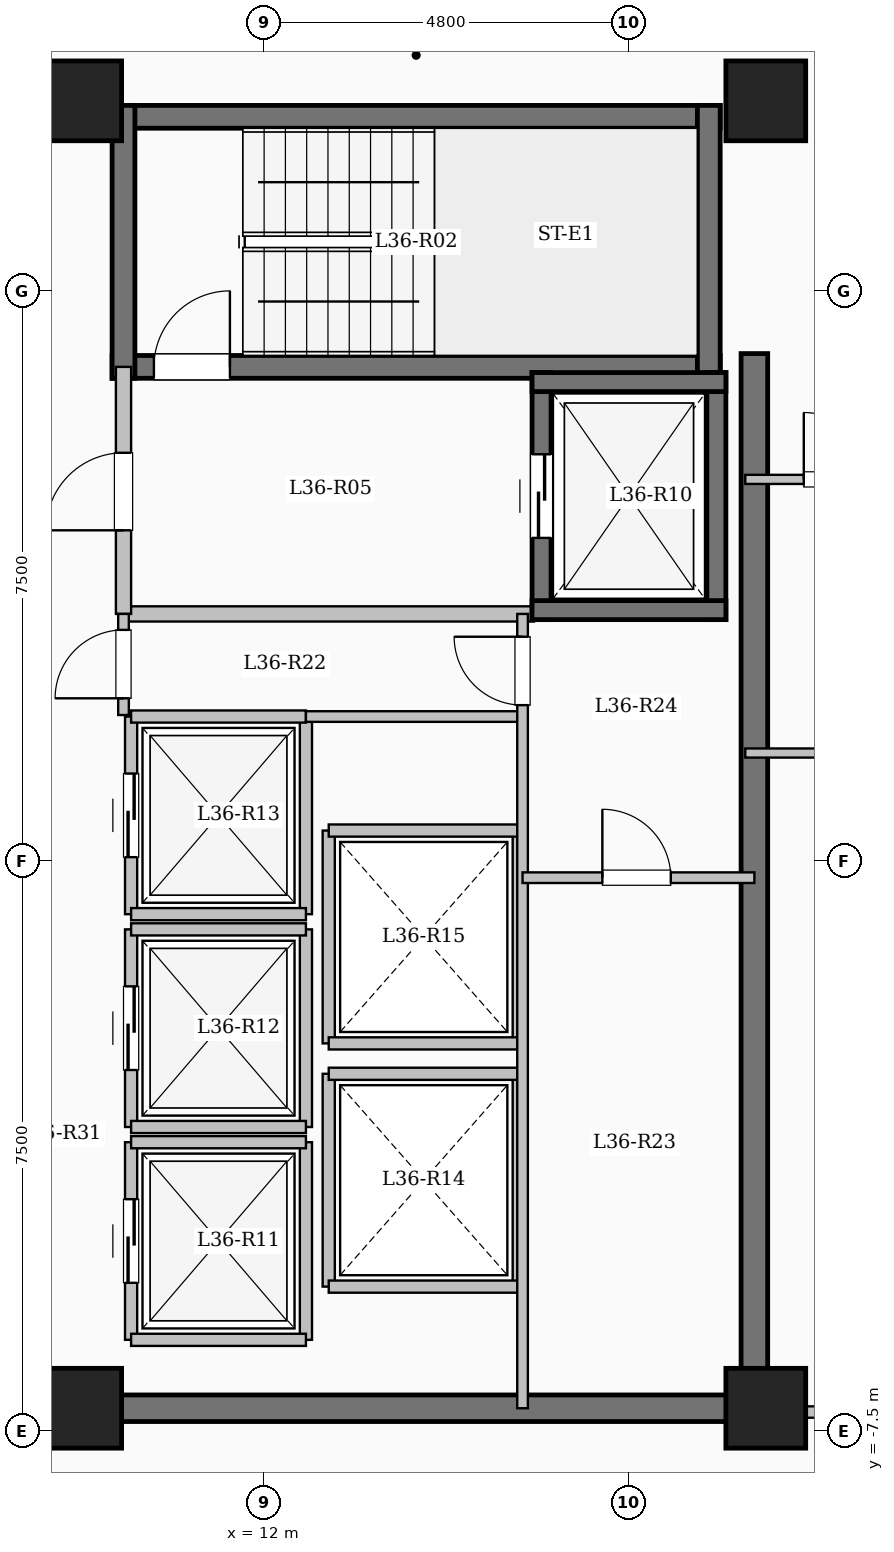
"""IFC4 building model, lengths in metres.
Left out: names, types, materials, properties, quantities, classifications, styles, units other than length and angle.
Written with IfcOpenShell. Run it as: python <this file> out.ifc"""

import sys

from ifc_helpers import new_model, si_unit, direction, frame, frame_2d, origin, origin_2d, place, context, subcontext, project, spatial, rectangle, extrude, element, fill, save


model = new_model("IFC4")
c1 = context("Model", 3, precision=1e-05, world=origin(), true_north=direction((0.0, 1.0)))
c2 = subcontext(c1, "Body", "Model", "MODEL_VIEW")
j1 = project(units=[si_unit("LENGTHUNIT", "METRE"), si_unit("PLANEANGLEUNIT", "RADIAN")], contexts=[c1])
p1 = place(None, origin())
s1 = spatial("IfcSite", under=j1, at=p1, CompositionType="ELEMENT")
p2 = place(p1, origin())
s2 = spatial("IfcBuilding", under=s1, at=p2, CompositionType="ELEMENT")
p3 = place(p2, frame((0.0, 0.0, 135.95)))
s3 = spatial("IfcBuildingStorey", under=s2, at=p3, CompositionType="ELEMENT", Elevation=135.95)
for number, where, z_axis, x_axis in (
    (1, (9.6, -7.2, 0.0), (0.0, 0.0, 1.0), (1.0, 0.0, 0.0)),
    (2, (9.6, 10.0, 0.0), (0.0, 0.0, 1.0), (1.0, 0.0, 0.0)),
    (3, (18.6, -7.2, 0.0), (0.0, 0.0, 1.0), (1.0, 0.0, 0.0)),
    (4, (18.6, 10.0, 0.0), (0.0, 0.0, 1.0), (1.0, 0.0, 0.0)),
):
    element("IfcColumn", number, at=place(p3, frame(where, z_axis=z_axis, x_axis=x_axis)), inside=s3, PredefinedType="COLUMN", context=c2, shape_type="SweptSolid", body=[
        extrude(rectangle(XDim=1.05, YDim=1.05, at=origin_2d()), origin(), (0.0, 0.0, 1.0), 3.35),
    ])
p4 = place(p3, frame((10.0, 9.79, 0.0), z_axis=(0.0, 0.0, 1.0), x_axis=(1.0, 0.0, 0.0)))
e5 = element("IfcWall", 5, at=p4, inside=s3, PredefinedType="SHEAR", context=c2, shape_type="SweptSolid", body=[
    extrude(rectangle(XDim=8.0, YDim=0.3, at=frame_2d((4.0, 0.0))), origin(), (0.0, 0.0, 1.0), 3.35),
])
p5 = place(p3, frame((10.0, 6.5, 0.0), z_axis=(0.0, 0.0, 1.0), x_axis=(1.0, 0.0, 0.0)))
e6 = element("IfcWall", 6, at=p5, inside=s3, PredefinedType="SHEAR", context=c2, shape_type="SweptSolid", body=[
    extrude(rectangle(XDim=8.0, YDim=0.3, at=frame_2d((4.0, 0.0))), origin(), (0.0, 0.0, 1.0), 3.35),
])
p6 = place(p5, frame((0.55, 0.0, 0.0)))
e7 = element("IfcOpeningElement", 7, at=p6, cuts=e6, PredefinedType="OPENING", context=c2, shape_type="SweptSolid", body=[
    extrude(rectangle(XDim=1.0, YDim=2.15, at=frame_2d((0.5, 1.075))), frame((0.0, 0.16, 0.0), z_axis=(0.0, -1.0, 0.0), x_axis=(1.0, 0.0, 0.0)), (0.0, 0.0, 1.0), 0.32),
])
for number, where, z_axis, x_axis in (
    (8, (10.15, 6.35, 0.0), (0.0, 0.0, 1.0), (0.0, 1.0, 0.0)),
    (9, (17.85, 6.35, 0.0), (0.0, 0.0, 1.0), (0.0, 1.0, 0.0)),
):
    element("IfcWall", number, at=place(p3, frame(where, z_axis=z_axis, x_axis=x_axis)), inside=s3, PredefinedType="SHEAR", context=c2, shape_type="SweptSolid", body=[
        extrude(rectangle(XDim=3.59, YDim=0.3, at=frame_2d((1.795, 0.0))), origin(), (0.0, 0.0, 1.0), 3.35),
    ])
p7 = place(p3, frame((10.15, 3.25, 0.0), z_axis=(0.0, 0.0, 1.0), x_axis=(1.0, 0.0, 0.0)))
e10 = element("IfcWall", 10, at=p7, inside=s3, PredefinedType="SOLIDWALL", context=c2, shape_type="SweptSolid", body=[
    extrude(rectangle(XDim=5.4, YDim=0.2, at=frame_2d((2.7, 0.0))), origin(), (0.0, 0.0, 1.0), 3.1),
])
p8 = place(p3, frame((10.15, 3.25, 0.0), z_axis=(0.0, 0.0, 1.0), x_axis=(0.0, 1.0, 0.0)))
e11 = element("IfcWall", 11, at=p8, inside=s3, PredefinedType="SOLIDWALL", context=c2, shape_type="SweptSolid", body=[
    extrude(rectangle(XDim=3.25, YDim=0.2, at=frame_2d((1.625, 0.0))), origin(), (0.0, 0.0, 1.0), 3.1),
])
p9 = place(p8, frame((1.1, 0.0, 0.0)))
e12 = element("IfcOpeningElement", 12, at=p9, cuts=e11, PredefinedType="OPENING", context=c2, shape_type="SweptSolid", body=[
    extrude(rectangle(XDim=1.02, YDim=2.15, at=frame_2d((0.51, 1.075))), frame((0.0, 0.11, 0.0), z_axis=(0.0, -1.0, 0.0), x_axis=(1.0, 0.0, 0.0)), (0.0, 0.0, 1.0), 0.22),
])
p10 = place(p3, frame((15.65, 3.175, 0.0), z_axis=(0.0, 0.0, 1.0), x_axis=(0.0, 1.0, 0.0)))
e13 = element("IfcWall", 13, at=p10, inside=s3, PredefinedType="SHEAR", context=c2, shape_type="SweptSolid", body=[
    extrude(rectangle(XDim=3.25, YDim=0.25, at=frame_2d((1.625, 0.0))), origin(), (0.0, 0.0, 1.0), 3.35),
])
p11 = place(p10, frame((1.075, 0.0, 0.0)))
e14 = element("IfcOpeningElement", 14, at=p11, cuts=e13, PredefinedType="OPENING", context=c2, shape_type="SweptSolid", body=[
    extrude(rectangle(XDim=1.1, YDim=2.15, at=frame_2d((0.55, 1.075))), frame((0.0, 0.135, 0.0), z_axis=(0.0, -1.0, 0.0), x_axis=(1.0, 0.0, 0.0)), (0.0, 0.0, 1.0), 0.27),
])
p12 = place(p3, frame((17.95, 3.175, 0.0), z_axis=(0.0, 0.0, 1.0), x_axis=(0.0, 1.0, 0.0)))
e15 = element("IfcWall", 15, at=p12, inside=s3, PredefinedType="SHEAR", context=c2, shape_type="SweptSolid", body=[
    extrude(rectangle(XDim=3.25, YDim=0.25, at=frame_2d((1.625, 0.0))), origin(), (0.0, 0.0, 1.0), 3.35),
])
for number, where, z_axis, x_axis in (
    (16, (15.525, 3.3, 0.0), (0.0, 0.0, 1.0), (1.0, 0.0, 0.0)),
    (17, (15.525, 6.3, 0.0), (0.0, 0.0, 1.0), (1.0, 0.0, 0.0)),
):
    element("IfcWall", number, at=place(p3, frame(where, z_axis=z_axis, x_axis=x_axis)), inside=s3, PredefinedType="SHEAR", context=c2, shape_type="SweptSolid", body=[
        extrude(rectangle(XDim=2.55, YDim=0.25, at=frame_2d((1.275, 0.0))), origin(), (0.0, 0.0, 1.0), 3.35),
    ])
p13 = place(p3, frame((10.25, -6.3, 0.0), z_axis=(0.0, 0.0, 1.0), x_axis=(0.0, 1.0, 0.0)))
e18 = element("IfcWall", 18, at=p13, inside=s3, PredefinedType="SOLIDWALL", context=c2, shape_type="SweptSolid", body=[
    extrude(rectangle(XDim=2.6, YDim=0.16, at=frame_2d((1.3, 0.0))), origin(), (0.0, 0.0, 1.0), 3.1),
])
p14 = place(p13, frame((0.75, 0.0, 0.0)))
e19 = element("IfcOpeningElement", 19, at=p14, cuts=e18, PredefinedType="OPENING", context=c2, shape_type="SweptSolid", body=[
    extrude(rectangle(XDim=1.1, YDim=2.15, at=frame_2d((0.55, 1.075))), frame((0.0, 0.09, 0.0), z_axis=(0.0, -1.0, 0.0), x_axis=(1.0, 0.0, 0.0)), (0.0, 0.0, 1.0), 0.18),
])
p15 = place(p3, frame((12.55, -6.3, 0.0), z_axis=(0.0, 0.0, 1.0), x_axis=(0.0, 1.0, 0.0)))
e20 = element("IfcWall", 20, at=p15, inside=s3, PredefinedType="SOLIDWALL", context=c2, shape_type="SweptSolid", body=[
    extrude(rectangle(XDim=2.6, YDim=0.16, at=frame_2d((1.3, 0.0))), origin(), (0.0, 0.0, 1.0), 3.1),
])
for number, where, z_axis, x_axis in (
    (21, (10.25, -6.3, 0.0), (0.0, 0.0, 1.0), (1.0, 0.0, 0.0)),
    (22, (10.25, -3.7, 0.0), (0.0, 0.0, 1.0), (1.0, 0.0, 0.0)),
):
    element("IfcWall", number, at=place(p3, frame(where, z_axis=z_axis, x_axis=x_axis)), inside=s3, PredefinedType="SOLIDWALL", context=c2, shape_type="SweptSolid", body=[
        extrude(rectangle(XDim=2.3, YDim=0.16, at=frame_2d((1.15, 0.0))), origin(), (0.0, 0.0, 1.0), 3.1),
    ])
p16 = place(p3, frame((10.25, -3.5, 0.0), z_axis=(0.0, 0.0, 1.0), x_axis=(0.0, 1.0, 0.0)))
e23 = element("IfcWall", 23, at=p16, inside=s3, PredefinedType="SOLIDWALL", context=c2, shape_type="SweptSolid", body=[
    extrude(rectangle(XDim=2.6, YDim=0.16, at=frame_2d((1.3, 0.0))), origin(), (0.0, 0.0, 1.0), 3.1),
])
p17 = place(p16, frame((0.75, 0.0, 0.0)))
e24 = element("IfcOpeningElement", 24, at=p17, cuts=e23, PredefinedType="OPENING", context=c2, shape_type="SweptSolid", body=[
    extrude(rectangle(XDim=1.1, YDim=2.15, at=frame_2d((0.55, 1.075))), frame((0.0, 0.09, 0.0), z_axis=(0.0, -1.0, 0.0), x_axis=(1.0, 0.0, 0.0)), (0.0, 0.0, 1.0), 0.18),
])
p18 = place(p3, frame((12.55, -3.5, 0.0), z_axis=(0.0, 0.0, 1.0), x_axis=(0.0, 1.0, 0.0)))
e25 = element("IfcWall", 25, at=p18, inside=s3, PredefinedType="SOLIDWALL", context=c2, shape_type="SweptSolid", body=[
    extrude(rectangle(XDim=2.6, YDim=0.16, at=frame_2d((1.3, 0.0))), origin(), (0.0, 0.0, 1.0), 3.1),
])
for number, where, z_axis, x_axis in (
    (26, (10.25, -3.5, 0.0), (0.0, 0.0, 1.0), (1.0, 0.0, 0.0)),
    (27, (10.25, -0.9, 0.0), (0.0, 0.0, 1.0), (1.0, 0.0, 0.0)),
):
    element("IfcWall", number, at=place(p3, frame(where, z_axis=z_axis, x_axis=x_axis)), inside=s3, PredefinedType="SOLIDWALL", context=c2, shape_type="SweptSolid", body=[
        extrude(rectangle(XDim=2.3, YDim=0.16, at=frame_2d((1.15, 0.0))), origin(), (0.0, 0.0, 1.0), 3.1),
    ])
p19 = place(p3, frame((10.25, -0.7, 0.0), z_axis=(0.0, 0.0, 1.0), x_axis=(0.0, 1.0, 0.0)))
e28 = element("IfcWall", 28, at=p19, inside=s3, PredefinedType="SOLIDWALL", context=c2, shape_type="SweptSolid", body=[
    extrude(rectangle(XDim=2.6, YDim=0.16, at=frame_2d((1.3, 0.0))), origin(), (0.0, 0.0, 1.0), 3.1),
])
p20 = place(p19, frame((0.75, 0.0, 0.0)))
e29 = element("IfcOpeningElement", 29, at=p20, cuts=e28, PredefinedType="OPENING", context=c2, shape_type="SweptSolid", body=[
    extrude(rectangle(XDim=1.1, YDim=2.15, at=frame_2d((0.55, 1.075))), frame((0.0, 0.09, 0.0), z_axis=(0.0, -1.0, 0.0), x_axis=(1.0, 0.0, 0.0)), (0.0, 0.0, 1.0), 0.18),
])
p21 = place(p3, frame((12.55, -0.7, 0.0), z_axis=(0.0, 0.0, 1.0), x_axis=(0.0, 1.0, 0.0)))
e30 = element("IfcWall", 30, at=p21, inside=s3, PredefinedType="SOLIDWALL", context=c2, shape_type="SweptSolid", body=[
    extrude(rectangle(XDim=2.6, YDim=0.16, at=frame_2d((1.3, 0.0))), origin(), (0.0, 0.0, 1.0), 3.1),
])
for number, where, z_axis, x_axis in (
    (31, (10.25, -0.7, 0.0), (0.0, 0.0, 1.0), (1.0, 0.0, 0.0)),
    (32, (10.25, 1.9, 0.0), (0.0, 0.0, 1.0), (1.0, 0.0, 0.0)),
):
    element("IfcWall", number, at=place(p3, frame(where, z_axis=z_axis, x_axis=x_axis)), inside=s3, PredefinedType="SOLIDWALL", context=c2, shape_type="SweptSolid", body=[
        extrude(rectangle(XDim=2.3, YDim=0.16, at=frame_2d((1.15, 0.0))), origin(), (0.0, 0.0, 1.0), 3.1),
    ])
for number, where, z_axis, x_axis in (
    (33, (12.85, -5.6, 0.0), (0.0, 0.0, 1.0), (0.0, 1.0, 0.0)),
    (34, (15.35, -5.6, 0.0), (0.0, 0.0, 1.0), (0.0, 1.0, 0.0)),
):
    element("IfcWall", number, at=place(p3, frame(where, z_axis=z_axis, x_axis=x_axis)), inside=s3, PredefinedType="SOLIDWALL", context=c2, shape_type="SweptSolid", body=[
        extrude(rectangle(XDim=2.8, YDim=0.16, at=frame_2d((1.4, 0.0))), origin(), (0.0, 0.0, 1.0), 3.1),
    ])
for number, where, z_axis, x_axis in (
    (35, (12.85, -5.6, 0.0), (0.0, 0.0, 1.0), (1.0, 0.0, 0.0)),
    (36, (12.85, -2.8, 0.0), (0.0, 0.0, 1.0), (1.0, 0.0, 0.0)),
):
    element("IfcWall", number, at=place(p3, frame(where, z_axis=z_axis, x_axis=x_axis)), inside=s3, PredefinedType="SOLIDWALL", context=c2, shape_type="SweptSolid", body=[
        extrude(rectangle(XDim=2.5, YDim=0.16, at=frame_2d((1.25, 0.0))), origin(), (0.0, 0.0, 1.0), 3.1),
    ])
for number, where, z_axis, x_axis in (
    (37, (12.85, -2.4, 0.0), (0.0, 0.0, 1.0), (0.0, 1.0, 0.0)),
    (38, (15.35, -2.4, 0.0), (0.0, 0.0, 1.0), (0.0, 1.0, 0.0)),
):
    element("IfcWall", number, at=place(p3, frame(where, z_axis=z_axis, x_axis=x_axis)), inside=s3, PredefinedType="SOLIDWALL", context=c2, shape_type="SweptSolid", body=[
        extrude(rectangle(XDim=2.8, YDim=0.16, at=frame_2d((1.4, 0.0))), origin(), (0.0, 0.0, 1.0), 3.1),
    ])
for number, where, z_axis, x_axis in (
    (39, (12.85, -2.4, 0.0), (0.0, 0.0, 1.0), (1.0, 0.0, 0.0)),
    (40, (12.85, 0.4, 0.0), (0.0, 0.0, 1.0), (1.0, 0.0, 0.0)),
):
    element("IfcWall", number, at=place(p3, frame(where, z_axis=z_axis, x_axis=x_axis)), inside=s3, PredefinedType="SOLIDWALL", context=c2, shape_type="SweptSolid", body=[
        extrude(rectangle(XDim=2.5, YDim=0.16, at=frame_2d((1.25, 0.0))), origin(), (0.0, 0.0, 1.0), 3.1),
    ])
p22 = place(p3, frame((18.45, -7.375, 0.0), z_axis=(0.0, 0.0, 1.0), x_axis=(0.0, 1.0, 0.0)))
e41 = element("IfcWall", 41, at=p22, inside=s3, PredefinedType="SHEAR", context=c2, shape_type="SweptSolid", body=[
    extrude(rectangle(XDim=14.05, YDim=0.35, at=frame_2d((7.025, 0.0))), origin(), (0.0, 0.0, 1.0), 3.35),
])
p23 = place(p3, frame((10.075, -7.2, 0.0), z_axis=(0.0, 0.0, 1.0), x_axis=(1.0, 0.0, 0.0)))
e42 = element("IfcWall", 42, at=p23, inside=s3, PredefinedType="SHEAR", context=c2, shape_type="SweptSolid", body=[
    extrude(rectangle(XDim=8.55, YDim=0.35, at=frame_2d((4.275, 0.0))), origin(), (0.0, 0.0, 1.0), 3.35),
])
p24 = place(p3, frame((12.55, 1.9, 0.0), z_axis=(0.0, 0.0, 1.0), x_axis=(1.0, 0.0, 0.0)))
e43 = element("IfcWall", 43, at=p24, inside=s3, PredefinedType="PARTITIONING", context=c2, shape_type="SweptSolid", body=[
    extrude(rectangle(XDim=2.85, YDim=0.14, at=frame_2d((1.425, 0.0))), origin(), (0.0, 0.0, 1.0), 3.1),
])
p25 = place(p3, frame((10.15, 1.92, 0.0), z_axis=(0.0, 0.0, 1.0), x_axis=(0.0, 1.0, 0.0)))
e44 = element("IfcWall", 44, at=p25, inside=s3, PredefinedType="PARTITIONING", context=c2, shape_type="SweptSolid", body=[
    extrude(rectangle(XDim=1.33, YDim=0.14, at=frame_2d((0.665, 0.0))), origin(), (0.0, 0.0, 1.0), 3.1),
])
p26 = place(p25, frame((0.22, 0.0, 0.0)))
e45 = element("IfcOpeningElement", 45, at=p26, cuts=e44, PredefinedType="OPENING", context=c2, shape_type="SweptSolid", body=[
    extrude(rectangle(XDim=0.9, YDim=2.08, at=frame_2d((0.45, 1.04))), frame((0.0, 0.08, 0.0), z_axis=(0.0, -1.0, 0.0), x_axis=(1.0, 0.0, 0.0)), (0.0, 0.0, 1.0), 0.16),
])
p27 = place(p3, frame((15.4, -7.2, 0.0), z_axis=(0.0, 0.0, 1.0), x_axis=(0.0, 1.0, 0.0)))
e46 = element("IfcWall", 46, at=p27, inside=s3, PredefinedType="PARTITIONING", context=c2, shape_type="SweptSolid", body=[
    extrude(rectangle(XDim=10.45, YDim=0.14, at=frame_2d((5.225, 0.0))), origin(), (0.0, 0.0, 1.0), 3.1),
])
p28 = place(p27, frame((9.25, 0.0, 0.0)))
e47 = element("IfcOpeningElement", 47, at=p28, cuts=e46, PredefinedType="OPENING", context=c2, shape_type="SweptSolid", body=[
    extrude(rectangle(XDim=0.9, YDim=2.08, at=frame_2d((0.45, 1.04))), frame((0.0, 0.08, 0.0), z_axis=(0.0, -1.0, 0.0), x_axis=(1.0, 0.0, 0.0)), (0.0, 0.0, 1.0), 0.16),
])
p29 = place(p3, frame((15.4, -0.22, 0.0), z_axis=(0.0, 0.0, 1.0), x_axis=(1.0, 0.0, 0.0)))
e48 = element("IfcWall", 48, at=p29, inside=s3, PredefinedType="PARTITIONING", context=c2, shape_type="SweptSolid", body=[
    extrude(rectangle(XDim=3.05, YDim=0.14, at=frame_2d((1.525, 0.0))), origin(), (0.0, 0.0, 1.0), 3.1),
])
p30 = place(p29, frame((1.05, 0.0, 0.0)))
e49 = element("IfcOpeningElement", 49, at=p30, cuts=e48, PredefinedType="OPENING", context=c2, shape_type="SweptSolid", body=[
    extrude(rectangle(XDim=0.9, YDim=2.08, at=frame_2d((0.45, 1.04))), frame((0.0, 0.08, 0.0), z_axis=(0.0, -1.0, 0.0), x_axis=(1.0, 0.0, 0.0)), (0.0, 0.0, 1.0), 0.16),
])
p31 = place(p3, frame((18.45, -7.25, 0.0), z_axis=(0.0, 0.0, 1.0), x_axis=(1.0, 0.0, 0.0)))
e50 = element("IfcWall", 50, at=p31, inside=s3, PredefinedType="PARTITIONING", context=c2, shape_type="SweptSolid", body=[
    extrude(rectangle(XDim=6.63, YDim=0.15, at=frame_2d((3.315, 0.0))), origin(), (0.0, 0.0, 1.0), 3.1),
])
p32 = place(p31, frame((1.95, 0.0, 0.0)))
e51 = element("IfcOpeningElement", 51, at=p32, cuts=e50, PredefinedType="OPENING", context=c2, shape_type="SweptSolid", body=[
    extrude(rectangle(XDim=0.96, YDim=2.15, at=frame_2d((0.48, 1.075))), frame((0.0, 0.085, 0.0), z_axis=(0.0, -1.0, 0.0), x_axis=(1.0, 0.0, 0.0)), (0.0, 0.0, 1.0), 0.17),
])
p33 = place(p3, frame((18.33, 1.42, 0.0), z_axis=(0.0, 0.0, 1.0), x_axis=(1.0, 0.0, 0.0)))
e52 = element("IfcWall", 52, at=p33, inside=s3, PredefinedType="PARTITIONING", context=c2, shape_type="SweptSolid", body=[
    extrude(rectangle(XDim=6.87, YDim=0.12, at=frame_2d((3.435, 0.0))), origin(), (0.0, 0.0, 1.0), 3.1),
])
p34 = place(p33, frame((1.413, 0.0, 0.0)))
e53 = element("IfcOpeningElement", 53, at=p34, cuts=e52, PredefinedType="OPENING", context=c2, shape_type="SweptSolid", body=[
    extrude(rectangle(XDim=0.88, YDim=2.1, at=frame_2d((0.44, 1.05))), frame((0.0, 0.07, 0.0), z_axis=(0.0, -1.0, 0.0), x_axis=(1.0, 0.0, 0.0)), (0.0, 0.0, 1.0), 0.14),
])
p35 = place(p33, frame((4.678, 0.0, 0.0)))
e54 = element("IfcOpeningElement", 54, at=p35, cuts=e52, PredefinedType="OPENING", context=c2, shape_type="SweptSolid", body=[
    extrude(rectangle(XDim=0.88, YDim=2.1, at=frame_2d((0.44, 1.05))), frame((0.0, 0.07, 0.0), z_axis=(0.0, -1.0, 0.0), x_axis=(1.0, 0.0, 0.0)), (0.0, 0.0, 1.0), 0.14),
])
p36 = place(p3, frame((18.33, 5.02, 0.0), z_axis=(0.0, 0.0, 1.0), x_axis=(1.0, 0.0, 0.0)))
e55 = element("IfcWall", 55, at=p36, inside=s3, PredefinedType="PARTITIONING", context=c2, shape_type="SweptSolid", body=[
    extrude(rectangle(XDim=6.87, YDim=0.12, at=frame_2d((3.435, 0.0))), origin(), (0.0, 0.0, 1.0), 3.1),
])
p37 = place(p36, frame((0.77, 0.0, 0.0)))
e56 = element("IfcOpeningElement", 56, at=p37, cuts=e55, PredefinedType="OPENING", context=c2, shape_type="SweptSolid", body=[
    extrude(rectangle(XDim=0.88, YDim=2.1, at=frame_2d((0.44, 1.05))), frame((0.0, 0.07, 0.0), z_axis=(0.0, -1.0, 0.0), x_axis=(1.0, 0.0, 0.0)), (0.0, 0.0, 1.0), 0.14),
])
p38 = place(p6, origin())
e57 = element("IfcDoor", 57, at=p38, inside=s3, OperationType="SINGLE_SWING_RIGHT", PredefinedType="DOOR", context=c2, shape_type="SweptSolid", body=[
    extrude(rectangle(XDim=1.0, YDim=2.15, at=frame_2d((0.5, 1.075))), frame((0.0, 0.025, 0.0), z_axis=(0.0, -1.0, 0.0), x_axis=(1.0, 0.0, 0.0)), (0.0, 0.0, 1.0), 0.05),
])
fill(e7, e57)
p39 = place(p9, origin())
e58 = element("IfcDoor", 58, at=p39, inside=s3, OperationType="SINGLE_SWING_LEFT", PredefinedType="DOOR", context=c2, shape_type="SweptSolid", body=[
    extrude(rectangle(XDim=1.02, YDim=2.15, at=frame_2d((0.51, 1.075))), frame((0.0, 0.025, 0.0), z_axis=(0.0, -1.0, 0.0), x_axis=(1.0, 0.0, 0.0)), (0.0, 0.0, 1.0), 0.05),
])
fill(e12, e58)
p40 = place(p11, origin())
e59 = element("IfcDoor", 59, at=p40, inside=s3, OperationType="SLIDING_TO_LEFT", PredefinedType="DOOR", context=c2, shape_type="SweptSolid", body=[
    extrude(rectangle(XDim=1.1, YDim=2.15, at=frame_2d((0.55, 1.075))), frame((0.0, 0.025, 0.0), z_axis=(0.0, -1.0, 0.0), x_axis=(1.0, 0.0, 0.0)), (0.0, 0.0, 1.0), 0.05),
])
fill(e14, e59)
p41 = place(p14, origin())
e60 = element("IfcDoor", 60, at=p41, inside=s3, OperationType="SLIDING_TO_LEFT", PredefinedType="DOOR", context=c2, shape_type="SweptSolid", body=[
    extrude(rectangle(XDim=1.1, YDim=2.15, at=frame_2d((0.55, 1.075))), frame((0.0, 0.025, 0.0), z_axis=(0.0, -1.0, 0.0), x_axis=(1.0, 0.0, 0.0)), (0.0, 0.0, 1.0), 0.05),
])
fill(e19, e60)
p42 = place(p17, origin())
e61 = element("IfcDoor", 61, at=p42, inside=s3, OperationType="SLIDING_TO_LEFT", PredefinedType="DOOR", context=c2, shape_type="SweptSolid", body=[
    extrude(rectangle(XDim=1.1, YDim=2.15, at=frame_2d((0.55, 1.075))), frame((0.0, 0.025, 0.0), z_axis=(0.0, -1.0, 0.0), x_axis=(1.0, 0.0, 0.0)), (0.0, 0.0, 1.0), 0.05),
])
fill(e24, e61)
p43 = place(p20, origin())
e62 = element("IfcDoor", 62, at=p43, inside=s3, OperationType="SLIDING_TO_LEFT", PredefinedType="DOOR", context=c2, shape_type="SweptSolid", body=[
    extrude(rectangle(XDim=1.1, YDim=2.15, at=frame_2d((0.55, 1.075))), frame((0.0, 0.025, 0.0), z_axis=(0.0, -1.0, 0.0), x_axis=(1.0, 0.0, 0.0)), (0.0, 0.0, 1.0), 0.05),
])
fill(e29, e62)
p44 = place(p26, origin())
e63 = element("IfcDoor", 63, at=p44, inside=s3, OperationType="SINGLE_SWING_LEFT", PredefinedType="DOOR", context=c2, shape_type="SweptSolid", body=[
    extrude(rectangle(XDim=0.9, YDim=2.08, at=frame_2d((0.45, 1.04))), frame((0.0, 0.025, 0.0), z_axis=(0.0, -1.0, 0.0), x_axis=(1.0, 0.0, 0.0)), (0.0, 0.0, 1.0), 0.05),
])
fill(e45, e63)
p45 = place(p28, origin())
e64 = element("IfcDoor", 64, at=p45, inside=s3, OperationType="SINGLE_SWING_RIGHT", PredefinedType="DOOR", context=c2, shape_type="SweptSolid", body=[
    extrude(rectangle(XDim=0.9, YDim=2.08, at=frame_2d((0.45, 1.04))), frame((0.0, 0.025, 0.0), z_axis=(0.0, -1.0, 0.0), x_axis=(1.0, 0.0, 0.0)), (0.0, 0.0, 1.0), 0.05),
])
fill(e47, e64)
p46 = place(p30, origin())
e65 = element("IfcDoor", 65, at=p46, inside=s3, OperationType="SINGLE_SWING_LEFT", PredefinedType="DOOR", context=c2, shape_type="SweptSolid", body=[
    extrude(rectangle(XDim=0.9, YDim=2.08, at=frame_2d((0.45, 1.04))), frame((0.0, 0.025, 0.0), z_axis=(0.0, -1.0, 0.0), x_axis=(1.0, 0.0, 0.0)), (0.0, 0.0, 1.0), 0.05),
])
fill(e49, e65)
p47 = place(p37, origin())
e66 = element("IfcDoor", 66, at=p47, inside=s3, OperationType="SINGLE_SWING_LEFT", PredefinedType="DOOR", context=c2, shape_type="SweptSolid", body=[
    extrude(rectangle(XDim=0.88, YDim=2.1, at=frame_2d((0.44, 1.05))), frame((0.0, 0.025, 0.0), z_axis=(0.0, -1.0, 0.0), x_axis=(1.0, 0.0, 0.0)), (0.0, 0.0, 1.0), 0.05),
])
fill(e56, e66)
save(model, sys.argv[1])
